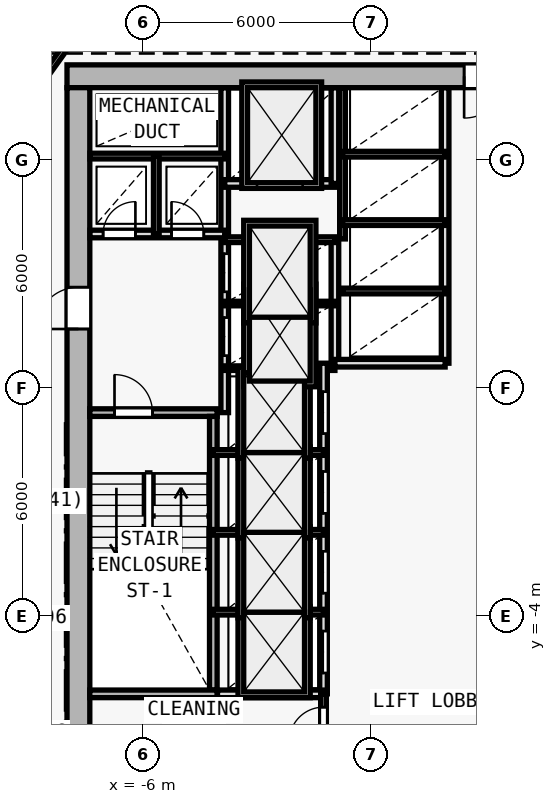
"""IFC4 building model, lengths in metres.
Left out: names, types, materials, properties, quantities, classifications, styles, units other than length and angle.
Written with IfcOpenShell. Run it as: python <this file> out.ifc"""

import sys

from ifc_helpers import new_model, si_unit, direction, frame, frame_2d, origin, origin_2d, place, context, subcontext, project, spatial, rectangle, i_section, extrude, element, fill, save


model = new_model("IFC4")
c1 = context("Model", 3, precision=1e-05, world=origin(), true_north=direction((0.0, 1.0)))
c2 = subcontext(c1, "Body", "Model", "MODEL_VIEW")
j1 = project(units=[si_unit("LENGTHUNIT", "METRE"), si_unit("PLANEANGLEUNIT", "RADIAN")], contexts=[c1])
p1 = place(None, origin())
s1 = spatial("IfcSite", under=j1, at=p1, CompositionType="ELEMENT")
p2 = place(p1, origin())
s2 = spatial("IfcBuilding", under=s1, at=p2, CompositionType="ELEMENT")
p3 = place(p2, frame((0.0, 0.0, 89.7)))
s3 = spatial("IfcBuildingStorey", under=s2, at=p3, CompositionType="ELEMENT", Elevation=89.7)
for number, where, z_axis, x_axis in (
    (1, (-7.7, 10.2, 0.0), (0.0, 0.0, 1.0), (1.0, 0.0, 0.0)),
    (2, (-7.7, 2.0, 0.0), (0.0, 0.0, 1.0), (1.0, 0.0, 0.0)),
):
    element("IfcColumn", number, at=place(p3, frame(where, z_axis=z_axis, x_axis=x_axis)), inside=s3, PredefinedType="COLUMN", context=c2, shape_type="SweptSolid", body=[
        extrude(i_section(OverallWidth=0.409, OverallDepth=0.425, WebThickness=0.021, FlangeThickness=0.034, FilletRadius=0.015, at=origin_2d()), origin(), (0.0, 0.0, 1.0), 3.6),
    ])
p4 = place(p3, frame((8.0, 10.2, 0.0), z_axis=(0.0, 0.0, 1.0), x_axis=(-1.0, 0.0, 0.0)))
e3 = element("IfcWall", 3, at=p4, inside=s3, PredefinedType="SHEAR", context=c2, shape_type="SweptSolid", body=[
    extrude(rectangle(XDim=16.0, YDim=0.6, at=frame_2d((8.0, 0.0))), origin(), (0.0, 0.0, 1.0), 3.35),
])
p5 = place(p4, frame((4.45, 0.0, 0.0)))
e4 = element("IfcOpeningElement", 4, at=p5, cuts=e3, PredefinedType="OPENING", context=c2, shape_type="SweptSolid", body=[
    extrude(rectangle(XDim=1.1, YDim=2.15, at=frame_2d((0.55, 1.075))), frame((0.0, 0.31, 0.0), z_axis=(0.0, -1.0, 0.0), x_axis=(1.0, 0.0, 0.0)), (0.0, 0.0, 1.0), 0.62),
])
p6 = place(p3, frame((-7.7, -9.1, 0.0), z_axis=(0.0, 0.0, 1.0), x_axis=(0.0, 1.0, 0.0)))
e5 = element("IfcWall", 5, at=p6, inside=s3, PredefinedType="SHEAR", context=c2, shape_type="SweptSolid", body=[
    extrude(rectangle(XDim=19.0, YDim=0.6, at=frame_2d((9.5, 0.0))), origin(), (0.0, 0.0, 1.0), 3.35),
])
p7 = place(p6, frame((12.65, 0.0, 0.0)))
e6 = element("IfcOpeningElement", 6, at=p7, cuts=e5, PredefinedType="OPENING", context=c2, shape_type="SweptSolid", body=[
    extrude(rectangle(XDim=1.1, YDim=2.15, at=frame_2d((0.55, 1.075))), frame((0.0, 0.31, 0.0), z_axis=(0.0, -1.0, 0.0), x_axis=(1.0, 0.0, 0.0)), (0.0, 0.0, 1.0), 0.62),
])
p8 = place(p3, frame((-7.4, 1.35, 0.0), z_axis=(0.0, 0.0, 1.0), x_axis=(1.0, 0.0, 0.0)))
e7 = element("IfcWall", 7, at=p8, inside=s3, PredefinedType="SOLIDWALL", context=c2, shape_type="SweptSolid", body=[
    extrude(rectangle(XDim=3.35, YDim=0.2, at=frame_2d((1.675, 0.0))), origin(), (0.0, 0.0, 1.0), 3.35),
])
p9 = place(p8, frame((0.65, 0.0, 0.0)))
e8 = element("IfcOpeningElement", 8, at=p9, cuts=e7, PredefinedType="OPENING", context=c2, shape_type="SweptSolid", body=[
    extrude(rectangle(XDim=1.0, YDim=2.15, at=frame_2d((0.5, 1.075))), frame((0.0, 0.11, 0.0), z_axis=(0.0, -1.0, 0.0), x_axis=(1.0, 0.0, 0.0)), (0.0, 0.0, 1.0), 0.22),
])
p10 = place(p3, frame((-4.15, -5.95, 0.0), z_axis=(0.0, 0.0, 1.0), x_axis=(0.0, 1.0, 0.0)))
e9 = element("IfcWall", 9, at=p10, inside=s3, PredefinedType="SOLIDWALL", context=c2, shape_type="SweptSolid", body=[
    extrude(rectangle(XDim=7.2, YDim=0.2, at=frame_2d((3.6, 0.0))), origin(), (0.0, 0.0, 1.0), 3.35),
])
p11 = place(p3, frame((-3.85, 1.35, 0.0), z_axis=(0.0, 0.0, 1.0), x_axis=(0.0, 1.0, 0.0)))
e10 = element("IfcWall", 10, at=p11, inside=s3, PredefinedType="SOLIDWALL", context=c2, shape_type="SweptSolid", body=[
    extrude(rectangle(XDim=8.545, YDim=0.2, at=frame_2d((4.272, 0.0))), origin(), (0.0, 0.0, 1.0), 3.35),
])
p12 = place(p11, frame((1.5, 0.0, 0.0)))
e11 = element("IfcOpeningElement", 11, at=p12, cuts=e10, PredefinedType="OPENING", context=c2, shape_type="SweptSolid", body=[
    extrude(rectangle(XDim=1.0, YDim=2.15, at=frame_2d((0.5, 1.075))), frame((0.0, 0.11, 0.0), z_axis=(0.0, -1.0, 0.0), x_axis=(1.0, 0.0, 0.0)), (0.0, 0.0, 1.0), 0.22),
])
p13 = place(p11, frame((3.18, 0.0, 0.0)))
e12 = element("IfcOpeningElement", 12, at=p13, cuts=e10, PredefinedType="OPENING", context=c2, shape_type="SweptSolid", body=[
    extrude(rectangle(XDim=1.0, YDim=2.15, at=frame_2d((0.5, 1.075))), frame((0.0, 0.11, 0.0), z_axis=(0.0, -1.0, 0.0), x_axis=(1.0, 0.0, 0.0)), (0.0, 0.0, 1.0), 0.22),
])
p14 = place(p3, frame((-7.395, 6.05, 0.0), z_axis=(0.0, 0.0, 1.0), x_axis=(1.0, 0.0, 0.0)))
e13 = element("IfcWall", 13, at=p14, inside=s3, PredefinedType="SOLIDWALL", context=c2, shape_type="SweptSolid", body=[
    extrude(rectangle(XDim=3.545, YDim=0.2, at=frame_2d((1.772, 0.0))), origin(), (0.0, 0.0, 1.0), 3.35),
])
p15 = place(p14, frame((0.345, 0.0, 0.0)))
e14 = element("IfcOpeningElement", 14, at=p15, cuts=e13, PredefinedType="OPENING", context=c2, shape_type="SweptSolid", body=[
    extrude(rectangle(XDim=0.85, YDim=2.1, at=frame_2d((0.425, 1.05))), frame((0.0, 0.11, 0.0), z_axis=(0.0, -1.0, 0.0), x_axis=(1.0, 0.0, 0.0)), (0.0, 0.0, 1.0), 0.22),
])
p16 = place(p14, frame((2.145, 0.0, 0.0)))
e15 = element("IfcOpeningElement", 15, at=p16, cuts=e13, PredefinedType="OPENING", context=c2, shape_type="SweptSolid", body=[
    extrude(rectangle(XDim=0.85, YDim=2.1, at=frame_2d((0.425, 1.05))), frame((0.0, 0.11, 0.0), z_axis=(0.0, -1.0, 0.0), x_axis=(1.0, 0.0, 0.0)), (0.0, 0.0, 1.0), 0.22),
])
p17 = place(p3, frame((-7.395, 8.1, 0.0), z_axis=(0.0, 0.0, 1.0), x_axis=(1.0, 0.0, 0.0)))
e16 = element("IfcWall", 16, at=p17, inside=s3, PredefinedType="PARTITIONING", context=c2, shape_type="SweptSolid", body=[
    extrude(rectangle(XDim=3.545, YDim=0.15, at=frame_2d((1.772, 0.0))), origin(), (0.0, 0.0, 1.0), 3.35),
])
p18 = place(p3, frame((-5.65, 6.05, 0.0), z_axis=(0.0, 0.0, 1.0), x_axis=(0.0, 1.0, 0.0)))
e17 = element("IfcWall", 17, at=p18, inside=s3, PredefinedType="PARTITIONING", context=c2, shape_type="SweptSolid", body=[
    extrude(rectangle(XDim=2.05, YDim=0.15, at=frame_2d((1.025, 0.0))), origin(), (0.0, 0.0, 1.0), 3.35),
])
p19 = place(p3, frame((-0.95, 2.65, 0.0), z_axis=(0.0, 0.0, 1.0), x_axis=(0.0, 1.0, 0.0)))
e18 = element("IfcWall", 18, at=p19, inside=s3, PredefinedType="SOLIDWALL", context=c2, shape_type="SweptSolid", body=[
    extrude(rectangle(XDim=3.27, YDim=0.2, at=frame_2d((1.635, 0.0))), origin(), (0.0, 0.0, 1.0), 3.35),
])
for number, where, z_axis, x_axis in (
    (19, (-3.85, 2.52, 0.0), (0.0, 0.0, 1.0), (1.0, 0.0, 0.0)),
    (20, (-3.85, 4.22, 0.0), (0.0, 0.0, 1.0), (1.0, 0.0, 0.0)),
):
    element("IfcWall", number, at=place(p3, frame(where, z_axis=z_axis, x_axis=x_axis)), inside=s3, PredefinedType="PARTITIONING", context=c2, shape_type="SweptSolid", body=[
        extrude(rectangle(XDim=2.9, YDim=0.12, at=frame_2d((1.45, 0.0))), origin(), (0.0, 0.0, 1.0), 3.35),
    ])
p20 = place(p3, frame((-3.85, 5.9, 0.0), z_axis=(0.0, 0.0, 1.0), x_axis=(1.0, 0.0, 0.0)))
e21 = element("IfcWall", 21, at=p20, inside=s3, PredefinedType="PARTITIONING", context=c2, shape_type="SweptSolid", body=[
    extrude(rectangle(XDim=2.9, YDim=0.15, at=frame_2d((1.45, 0.0))), origin(), (0.0, 0.0, 1.0), 3.35),
])
p21 = place(p3, frame((-3.85, 7.38, 0.0), z_axis=(0.0, 0.0, 1.0), x_axis=(1.0, 0.0, 0.0)))
e22 = element("IfcWall", 22, at=p21, inside=s3, PredefinedType="SOLIDWALL", context=c2, shape_type="SweptSolid", body=[
    extrude(rectangle(XDim=2.9, YDim=0.2, at=frame_2d((1.45, 0.0))), origin(), (0.0, 0.0, 1.0), 3.35),
])
p22 = place(p21, frame((0.85, 0.0, 0.0)))
e23 = element("IfcOpeningElement", 23, at=p22, cuts=e22, PredefinedType="OPENING", context=c2, shape_type="SweptSolid", body=[
    extrude(rectangle(XDim=1.2, YDim=2.2, at=frame_2d((0.6, 1.1))), frame((0.0, 0.11, 0.0), z_axis=(0.0, -1.0, 0.0), x_axis=(1.0, 0.0, 0.0)), (0.0, 0.0, 1.0), 0.22),
])
p23 = place(p3, frame((-0.95, 7.38, 0.0), z_axis=(0.0, 0.0, 1.0), x_axis=(0.0, 1.0, 0.0)))
e24 = element("IfcWall", 24, at=p23, inside=s3, PredefinedType="SOLIDWALL", context=c2, shape_type="SweptSolid", body=[
    extrude(rectangle(XDim=2.515, YDim=0.2, at=frame_2d((1.258, 0.0))), origin(), (0.0, 0.0, 1.0), 3.35),
])
p24 = place(p3, frame((-1.25, -6.05, 0.0), z_axis=(0.0, 0.0, 1.0), x_axis=(0.0, 1.0, 0.0)))
e25 = element("IfcWall", 25, at=p24, inside=s3, PredefinedType="SOLIDWALL", context=c2, shape_type="SweptSolid", body=[
    extrude(rectangle(XDim=8.7, YDim=0.2, at=frame_2d((4.35, 0.0))), origin(), (0.0, 0.0, 1.0), 3.35),
])
p25 = place(p24, frame((0.55, 0.0, 0.0)))
e26 = element("IfcOpeningElement", 26, at=p25, cuts=e25, PredefinedType="OPENING", context=c2, shape_type="SweptSolid", body=[
    extrude(rectangle(XDim=1.1, YDim=2.15, at=frame_2d((0.55, 1.075))), frame((0.0, 0.11, 0.0), z_axis=(0.0, -1.0, 0.0), x_axis=(1.0, 0.0, 0.0)), (0.0, 0.0, 1.0), 0.22),
])
p26 = place(p24, frame((2.65, 0.0, 0.0)))
e27 = element("IfcOpeningElement", 27, at=p26, cuts=e25, PredefinedType="OPENING", context=c2, shape_type="SweptSolid", body=[
    extrude(rectangle(XDim=1.1, YDim=2.15, at=frame_2d((0.55, 1.075))), frame((0.0, 0.11, 0.0), z_axis=(0.0, -1.0, 0.0), x_axis=(1.0, 0.0, 0.0)), (0.0, 0.0, 1.0), 0.22),
])
p27 = place(p24, frame((4.75, 0.0, 0.0)))
e28 = element("IfcOpeningElement", 28, at=p27, cuts=e25, PredefinedType="OPENING", context=c2, shape_type="SweptSolid", body=[
    extrude(rectangle(XDim=1.1, YDim=2.15, at=frame_2d((0.55, 1.075))), frame((0.0, 0.11, 0.0), z_axis=(0.0, -1.0, 0.0), x_axis=(1.0, 0.0, 0.0)), (0.0, 0.0, 1.0), 0.22),
])
p28 = place(p24, frame((6.85, 0.0, 0.0)))
e29 = element("IfcOpeningElement", 29, at=p28, cuts=e25, PredefinedType="OPENING", context=c2, shape_type="SweptSolid", body=[
    extrude(rectangle(XDim=1.1, YDim=2.15, at=frame_2d((0.55, 1.075))), frame((0.0, 0.11, 0.0), z_axis=(0.0, -1.0, 0.0), x_axis=(1.0, 0.0, 0.0)), (0.0, 0.0, 1.0), 0.22),
])
for number, where, z_axis, x_axis in (
    (30, (-4.15, -3.9, 0.0), (0.0, 0.0, 1.0), (1.0, 0.0, 0.0)),
    (31, (-4.15, -1.8, 0.0), (0.0, 0.0, 1.0), (1.0, 0.0, 0.0)),
    (32, (-4.15, 0.3, 0.0), (0.0, 0.0, 1.0), (1.0, 0.0, 0.0)),
):
    element("IfcWall", number, at=place(p3, frame(where, z_axis=z_axis, x_axis=x_axis)), inside=s3, PredefinedType="PARTITIONING", context=c2, shape_type="SweptSolid", body=[
        extrude(rectangle(XDim=2.9, YDim=0.15, at=frame_2d((1.45, 0.0))), origin(), (0.0, 0.0, 1.0), 3.35),
    ])
p29 = place(p3, frame((1.95, 2.65, 0.0), z_axis=(0.0, 0.0, 1.0), x_axis=(0.0, 1.0, 0.0)))
e33 = element("IfcWall", 33, at=p29, inside=s3, PredefinedType="SOLIDWALL", context=c2, shape_type="SweptSolid", body=[
    extrude(rectangle(XDim=7.245, YDim=0.2, at=frame_2d((3.623, 0.0))), origin(), (0.0, 0.0, 1.0), 3.35),
])
p30 = place(p3, frame((-0.95, 2.65, 0.0), z_axis=(0.0, 0.0, 1.0), x_axis=(1.0, 0.0, 0.0)))
e34 = element("IfcWall", 34, at=p30, inside=s3, PredefinedType="SOLIDWALL", context=c2, shape_type="SweptSolid", body=[
    extrude(rectangle(XDim=2.9, YDim=0.2, at=frame_2d((1.45, 0.0))), origin(), (0.0, 0.0, 1.0), 3.35),
])
p31 = place(p3, frame((-0.75, 5.92, 0.0), z_axis=(0.0, 0.0, 1.0), x_axis=(0.0, 1.0, 0.0)))
e35 = element("IfcWall", 35, at=p31, inside=s3, PredefinedType="PARTITIONING", context=c2, shape_type="SweptSolid", body=[
    extrude(rectangle(XDim=3.975, YDim=0.15, at=frame_2d((1.988, 0.0))), origin(), (0.0, 0.0, 1.0), 3.35),
])
for number, where, z_axis, x_axis in (
    (36, (-0.75, 4.55, 0.0), (0.0, 0.0, 1.0), (1.0, 0.0, 0.0)),
    (37, (-0.75, 6.35, 0.0), (0.0, 0.0, 1.0), (1.0, 0.0, 0.0)),
    (38, (-0.75, 8.15, 0.0), (0.0, 0.0, 1.0), (1.0, 0.0, 0.0)),
):
    element("IfcWall", number, at=place(p3, frame(where, z_axis=z_axis, x_axis=x_axis)), inside=s3, PredefinedType="PARTITIONING", context=c2, shape_type="SweptSolid", body=[
        extrude(rectangle(XDim=2.7, YDim=0.15, at=frame_2d((1.35, 0.0))), origin(), (0.0, 0.0, 1.0), 3.35),
    ])
p32 = place(p3, frame((-7.4, -6.05, 0.0), z_axis=(0.0, 0.0, 1.0), x_axis=(1.0, 0.0, 0.0)))
e39 = element("IfcWall", 39, at=p32, inside=s3, PredefinedType="SOLIDWALL", context=c2, shape_type="SweptSolid", body=[
    extrude(rectangle(XDim=3.35, YDim=0.2, at=frame_2d((1.675, 0.0))), origin(), (0.0, 0.0, 1.0), 3.35),
])
p33 = place(p3, frame((-4.04, -6.05, 0.0), z_axis=(0.0, 0.0, 1.0), x_axis=(1.0, 0.0, 0.0)))
e40 = element("IfcWall", 40, at=p33, inside=s3, PredefinedType="SOLIDWALL", context=c2, shape_type="SweptSolid", body=[
    extrude(rectangle(XDim=2.79, YDim=0.2, at=frame_2d((1.395, 0.0))), origin(), (0.0, 0.0, 1.0), 3.35),
])
p34 = place(p3, frame((-1.25, -9.095, 0.0), z_axis=(0.0, 0.0, 1.0), x_axis=(0.0, 1.0, 0.0)))
e41 = element("IfcWall", 41, at=p34, inside=s3, PredefinedType="PARTITIONING", context=c2, shape_type="SweptSolid", body=[
    extrude(rectangle(XDim=3.045, YDim=0.15, at=frame_2d((1.522, 0.0))), origin(), (0.0, 0.0, 1.0), 3.35),
])
p35 = place(p34, frame((1.795, 0.0, 0.0)))
e42 = element("IfcOpeningElement", 42, at=p35, cuts=e41, PredefinedType="OPENING", context=c2, shape_type="SweptSolid", body=[
    extrude(rectangle(XDim=0.9, YDim=2.1, at=frame_2d((0.45, 1.05))), frame((0.0, 0.085, 0.0), z_axis=(0.0, -1.0, 0.0), x_axis=(1.0, 0.0, 0.0)), (0.0, 0.0, 1.0), 0.17),
])
p36 = place(p34, frame((0.245, 0.0, 0.0)))
e43 = element("IfcOpeningElement", 43, at=p36, cuts=e41, PredefinedType="OPENING", context=c2, shape_type="SweptSolid", body=[
    extrude(rectangle(XDim=0.9, YDim=2.1, at=frame_2d((0.45, 1.05))), frame((0.0, 0.085, 0.0), z_axis=(0.0, -1.0, 0.0), x_axis=(1.0, 0.0, 0.0)), (0.0, 0.0, 1.0), 0.17),
])
p37 = place(p3, frame((-9.86, 8.426, 0.0), z_axis=(0.0, 0.0, 1.0), x_axis=(0.582449511476, 0.812866881218, 0.0)))
e44 = element("IfcWall", 44, at=p37, inside=s3, PredefinedType="PARTITIONING", context=c2, shape_type="SweptSolid", body=[
    extrude(rectangle(XDim=4.84, YDim=0.15, at=frame_2d((2.42, 0.0))), origin(), (0.0, 0.0, 1.0), 2.725),
])
p38 = place(p7, origin())
e45 = element("IfcDoor", 45, at=p38, inside=s3, OperationType="SINGLE_SWING_LEFT", PredefinedType="DOOR", context=c2, shape_type="SweptSolid", body=[
    extrude(rectangle(XDim=1.1, YDim=2.15, at=frame_2d((0.55, 1.075))), frame((0.0, 0.025, 0.0), z_axis=(0.0, -1.0, 0.0), x_axis=(1.0, 0.0, 0.0)), (0.0, 0.0, 1.0), 0.05),
])
fill(e6, e45)
p39 = place(p5, origin())
e46 = element("IfcDoor", 46, at=p39, inside=s3, OperationType="SINGLE_SWING_RIGHT", PredefinedType="DOOR", context=c2, shape_type="SweptSolid", body=[
    extrude(rectangle(XDim=1.1, YDim=2.15, at=frame_2d((0.55, 1.075))), frame((0.0, 0.025, 0.0), z_axis=(0.0, -1.0, 0.0), x_axis=(1.0, 0.0, 0.0)), (0.0, 0.0, 1.0), 0.05),
])
fill(e4, e46)
p40 = place(p9, origin())
e47 = element("IfcDoor", 47, at=p40, inside=s3, OperationType="SINGLE_SWING_LEFT", PredefinedType="DOOR", context=c2, shape_type="SweptSolid", body=[
    extrude(rectangle(XDim=1.0, YDim=2.15, at=frame_2d((0.5, 1.075))), frame((0.0, 0.025, 0.0), z_axis=(0.0, -1.0, 0.0), x_axis=(1.0, 0.0, 0.0)), (0.0, 0.0, 1.0), 0.05),
])
fill(e8, e47)
p41 = place(p15, origin())
e48 = element("IfcDoor", 48, at=p41, inside=s3, OperationType="SINGLE_SWING_RIGHT", PredefinedType="DOOR", context=c2, shape_type="SweptSolid", body=[
    extrude(rectangle(XDim=0.85, YDim=2.1, at=frame_2d((0.425, 1.05))), frame((0.0, 0.025, 0.0), z_axis=(0.0, -1.0, 0.0), x_axis=(1.0, 0.0, 0.0)), (0.0, 0.0, 1.0), 0.05),
])
fill(e14, e48)
p42 = place(p16, origin())
e49 = element("IfcDoor", 49, at=p42, inside=s3, OperationType="SINGLE_SWING_LEFT", PredefinedType="DOOR", context=c2, shape_type="SweptSolid", body=[
    extrude(rectangle(XDim=0.85, YDim=2.1, at=frame_2d((0.425, 1.05))), frame((0.0, 0.025, 0.0), z_axis=(0.0, -1.0, 0.0), x_axis=(1.0, 0.0, 0.0)), (0.0, 0.0, 1.0), 0.05),
])
fill(e15, e49)
p43 = place(p22, origin())
e50 = element("IfcDoor", 50, at=p43, inside=s3, OperationType="DOUBLE_DOOR_SLIDING", PredefinedType="DOOR", context=c2, shape_type="SweptSolid", body=[
    extrude(rectangle(XDim=1.2, YDim=2.2, at=frame_2d((0.6, 1.1))), frame((0.0, 0.025, 0.0), z_axis=(0.0, -1.0, 0.0), x_axis=(1.0, 0.0, 0.0)), (0.0, 0.0, 1.0), 0.05),
])
fill(e23, e50)
p44 = place(p25, origin())
e51 = element("IfcDoor", 51, at=p44, inside=s3, OperationType="DOUBLE_DOOR_SLIDING", PredefinedType="DOOR", context=c2, shape_type="SweptSolid", body=[
    extrude(rectangle(XDim=1.1, YDim=2.15, at=frame_2d((0.55, 1.075))), frame((0.0, 0.025, 0.0), z_axis=(0.0, -1.0, 0.0), x_axis=(1.0, 0.0, 0.0)), (0.0, 0.0, 1.0), 0.05),
])
fill(e26, e51)
p45 = place(p26, origin())
e52 = element("IfcDoor", 52, at=p45, inside=s3, OperationType="DOUBLE_DOOR_SLIDING", PredefinedType="DOOR", context=c2, shape_type="SweptSolid", body=[
    extrude(rectangle(XDim=1.1, YDim=2.15, at=frame_2d((0.55, 1.075))), frame((0.0, 0.025, 0.0), z_axis=(0.0, -1.0, 0.0), x_axis=(1.0, 0.0, 0.0)), (0.0, 0.0, 1.0), 0.05),
])
fill(e27, e52)
p46 = place(p27, origin())
e53 = element("IfcDoor", 53, at=p46, inside=s3, OperationType="DOUBLE_DOOR_SLIDING", PredefinedType="DOOR", context=c2, shape_type="SweptSolid", body=[
    extrude(rectangle(XDim=1.1, YDim=2.15, at=frame_2d((0.55, 1.075))), frame((0.0, 0.025, 0.0), z_axis=(0.0, -1.0, 0.0), x_axis=(1.0, 0.0, 0.0)), (0.0, 0.0, 1.0), 0.05),
])
fill(e28, e53)
p47 = place(p28, origin())
e54 = element("IfcDoor", 54, at=p47, inside=s3, OperationType="DOUBLE_DOOR_SLIDING", PredefinedType="DOOR", context=c2, shape_type="SweptSolid", body=[
    extrude(rectangle(XDim=1.1, YDim=2.15, at=frame_2d((0.55, 1.075))), frame((0.0, 0.025, 0.0), z_axis=(0.0, -1.0, 0.0), x_axis=(1.0, 0.0, 0.0)), (0.0, 0.0, 1.0), 0.05),
])
fill(e29, e54)
p48 = place(p12, origin())
e55 = element("IfcDoor", 55, at=p48, inside=s3, OperationType="DOUBLE_DOOR_SLIDING", PredefinedType="DOOR", context=c2, shape_type="SweptSolid", body=[
    extrude(rectangle(XDim=1.0, YDim=2.15, at=frame_2d((0.5, 1.075))), frame((0.0, 0.025, 0.0), z_axis=(0.0, -1.0, 0.0), x_axis=(1.0, 0.0, 0.0)), (0.0, 0.0, 1.0), 0.05),
])
fill(e11, e55)
p49 = place(p13, origin())
e56 = element("IfcDoor", 56, at=p49, inside=s3, OperationType="DOUBLE_DOOR_SLIDING", PredefinedType="DOOR", context=c2, shape_type="SweptSolid", body=[
    extrude(rectangle(XDim=1.0, YDim=2.15, at=frame_2d((0.5, 1.075))), frame((0.0, 0.025, 0.0), z_axis=(0.0, -1.0, 0.0), x_axis=(1.0, 0.0, 0.0)), (0.0, 0.0, 1.0), 0.05),
])
fill(e12, e56)
p50 = place(p35, origin())
e57 = element("IfcDoor", 57, at=p50, inside=s3, OperationType="SINGLE_SWING_LEFT", PredefinedType="DOOR", context=c2, shape_type="SweptSolid", body=[
    extrude(rectangle(XDim=0.9, YDim=2.1, at=frame_2d((0.45, 1.05))), frame((0.0, 0.025, 0.0), z_axis=(0.0, -1.0, 0.0), x_axis=(1.0, 0.0, 0.0)), (0.0, 0.0, 1.0), 0.05),
])
fill(e42, e57)
save(model, sys.argv[1])
